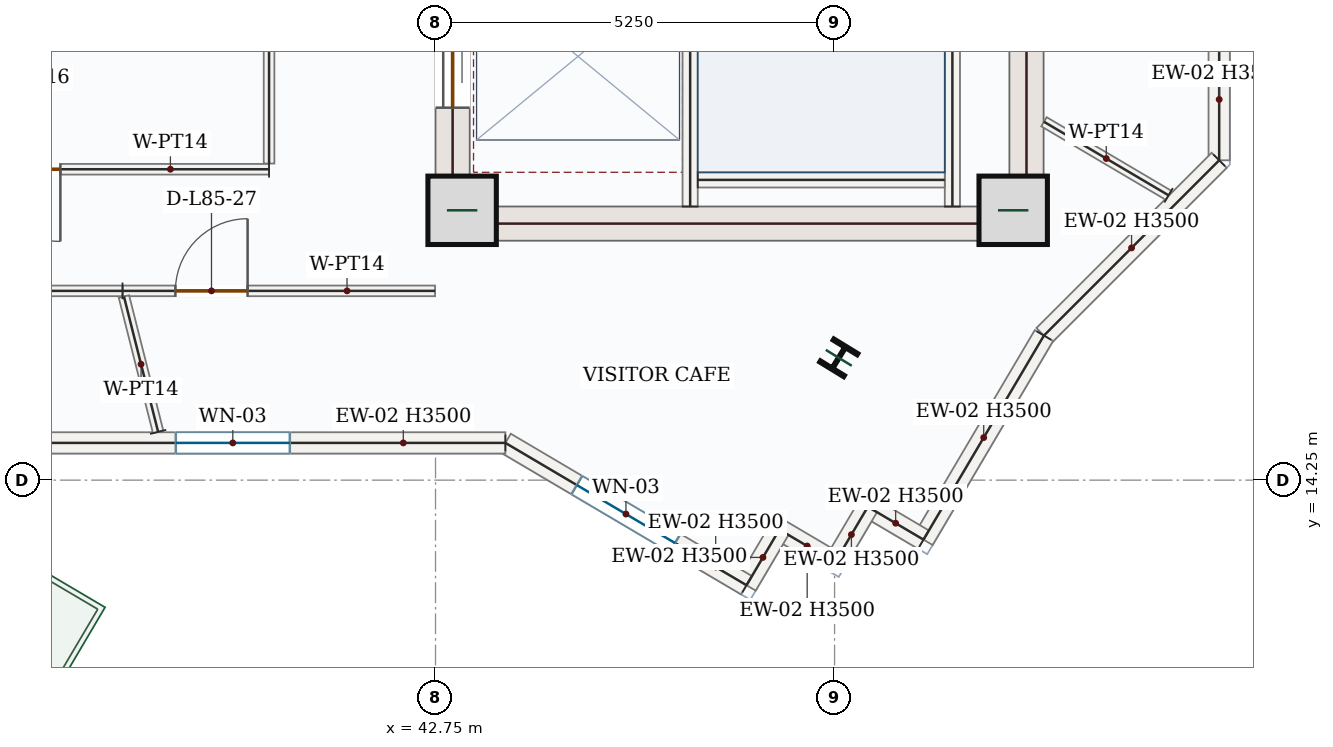
"""IFC4 building model, lengths in metres.
Left out: names, types, materials, properties, quantities, classifications, styles, units other than length and angle.
Written with IfcOpenShell. Run it as: python <this file> out.ifc"""

import sys

from ifc_helpers import new_model, si_unit, direction, frame, frame_2d, origin, origin_2d, place, context, subcontext, project, spatial, rectangle, i_section, extrude, source, transform, mapped, element, fill, save


model = new_model("IFC4")
c1 = context("Model", 3, precision=1e-05, world=origin(), true_north=direction((0.0, 1.0)))
c2 = subcontext(c1, "Body", "Model", "MODEL_VIEW")
j1 = project(units=[si_unit("LENGTHUNIT", "METRE"), si_unit("PLANEANGLEUNIT", "RADIAN")], contexts=[c1])
p1 = place(None, origin())
s1 = spatial("IfcSite", under=j1, at=p1, CompositionType="ELEMENT")
p2 = place(p1, origin())
s2 = spatial("IfcBuilding", under=s1, at=p2, CompositionType="ELEMENT")
p3 = place(p2, frame((0.0, 0.0, 349.8)))
s3 = spatial("IfcBuildingStorey", under=s2, at=p3, CompositionType="ELEMENT", Elevation=349.8)
p4 = place(p3, frame((42.975, 17.4, 0.0), z_axis=(0.0, 0.0, 1.0), x_axis=(0.0, 1.0, 0.0)))
e1 = element("IfcWall", 1, at=p4, inside=s3, PredefinedType="SHEAR", context=c2, shape_type="SweptSolid", body=[
    extrude(rectangle(XDim=8.55, YDim=0.45, at=frame_2d((4.275, 0.0))), origin(), (0.0, 0.0, 1.0), 3.5),
])
p5 = place(p4, frame((6.65, 0.0, 0.0)))
e2 = element("IfcOpeningElement", 2, at=p5, cuts=e1, PredefinedType="OPENING", context=c2, shape_type="SweptSolid", body=[
    extrude(rectangle(XDim=1.1, YDim=2.2, at=frame_2d((0.55, 1.1))), frame((0.0, 0.235, 0.0), z_axis=(0.0, -1.0, 0.0), x_axis=(1.0, 0.0, 0.0)), (0.0, 0.0, 1.0), 0.47),
])
p6 = place(p4, frame((1.75, 0.0, 0.0)))
e3 = element("IfcOpeningElement", 3, at=p6, cuts=e1, PredefinedType="OPENING", context=c2, shape_type="SweptSolid", body=[
    extrude(rectangle(XDim=1.3, YDim=2.2, at=frame_2d((0.65, 1.1))), frame((0.0, 0.235, 0.0), z_axis=(0.0, -1.0, 0.0), x_axis=(1.0, 0.0, 0.0)), (0.0, 0.0, 1.0), 0.47),
])
p7 = place(p4, frame((4.3, 0.0, 0.0)))
e4 = element("IfcOpeningElement", 4, at=p7, cuts=e1, PredefinedType="OPENING", context=c2, shape_type="SweptSolid", body=[
    extrude(rectangle(XDim=0.88, YDim=2.1, at=frame_2d((0.44, 1.05))), frame((0.0, 0.235, 0.0), z_axis=(0.0, -1.0, 0.0), x_axis=(1.0, 0.0, 0.0)), (0.0, 0.0, 1.0), 0.47),
])
m1 = source(origin(), c2, "Body", "SweptSolid", [
    extrude(rectangle(XDim=8.55, YDim=0.45, at=frame_2d((4.275, 0.0))), origin(), (0.0, 0.0, 1.0), 3.5),
])
p8 = place(p3, frame((50.525, 17.4, 0.0), z_axis=(0.0, 0.0, 1.0), x_axis=(0.0, 1.0, 0.0)))
e5 = element("IfcWall", 5, at=p8, inside=s3, PredefinedType="SHEAR", context=c2, shape_type="MappedRepresentation", body=[
    mapped(m1, transform((0.0, 0.0, 0.0), x_axis=(1.0, 0.0, 0.0), y_axis=(0.0, 1.0, 0.0), z_axis=(0.0, 0.0, 1.0), scale=1.0)),
])
m2 = source(origin(), c2, "Body", "SweptSolid", [
    extrude(rectangle(XDim=7.1, YDim=0.45, at=frame_2d((3.55, 0.0))), origin(), (0.0, 0.0, 1.0), 3.5),
])
p9 = place(p3, frame((43.2, 17.625, 0.0), z_axis=(0.0, 0.0, 1.0), x_axis=(1.0, 0.0, 0.0)))
e6 = element("IfcWall", 6, at=p9, inside=s3, PredefinedType="SHEAR", context=c2, shape_type="MappedRepresentation", body=[
    mapped(m2, transform((0.0, 0.0, 0.0), x_axis=(1.0, 0.0, 0.0), y_axis=(0.0, 1.0, 0.0), z_axis=(0.0, 0.0, 1.0), scale=1.0)),
])
m3 = source(origin(), c2, "Body", "SweptSolid", [
    extrude(rectangle(XDim=0.9, YDim=0.9, at=origin_2d()), origin(), (0.0, 0.0, 1.0), 3.75),
])
for number, where, z_axis, x_axis in (
    (7, (43.1, 17.8, 0.0), (0.0, 0.0, 1.0), (1.0, 0.0, 0.0)),
    (8, (50.35, 17.8, 0.0), (0.0, 0.0, 1.0), (1.0, 0.0, 0.0)),
):
    element("IfcColumn", number, at=place(p3, frame(where, z_axis=z_axis, x_axis=x_axis)), inside=s3, PredefinedType="COLUMN", context=c2, shape_type="MappedRepresentation", body=[
        mapped(m3, transform((0.0, 0.0, 0.0), x_axis=(1.0, 0.0, 0.0), y_axis=(0.0, 1.0, 0.0), z_axis=(0.0, 0.0, 1.0), scale=1.0)),
    ])
m4 = source(origin(), c2, "Body", "SweptSolid", [
    extrude(i_section(OverallWidth=0.369, OverallDepth=0.356, WebThickness=0.011, FlangeThickness=0.018, FilletRadius=0.018, at=origin_2d()), origin(), (0.0, 0.0, 1.0), 3.75),
])
p10 = place(p3, frame((48.055, 15.859, 0.0), z_axis=(0.0, 0.0, 1.0), x_axis=(-0.852640164354, 0.522498564716, 0.0)))
e9 = element("IfcColumn", 9, at=p10, inside=s3, PredefinedType="COLUMN", context=c2, shape_type="MappedRepresentation", body=[
    mapped(m4, transform((0.0, 0.0, 0.0), x_axis=(1.0, 0.0, 0.0), y_axis=(0.0, 1.0, 0.0), z_axis=(0.0, 0.0, 1.0), scale=1.0)),
])
m5 = source(origin(), c2, "Body", "SweptSolid", [
    extrude(rectangle(XDim=1.601, YDim=0.28, at=frame_2d((0.8, 0.0))), origin(), (0.0, 0.0, 1.0), 3.5),
])
p11 = place(p3, frame((53.06, 20.059, 0.0), z_axis=(0.0, 0.0, 1.0), x_axis=(0.0, -1.0, 0.0)))
e10 = element("IfcWall", 10, at=p11, inside=s3, PredefinedType="SOLIDWALL", context=c2, shape_type="MappedRepresentation", body=[
    mapped(m5, transform((0.0, 0.0, 0.0), x_axis=(1.0, 0.0, 0.0), y_axis=(0.0, 1.0, 0.0), z_axis=(0.0, 0.0, 1.0), scale=1.0)),
])
m6 = source(origin(), c2, "Body", "SweptSolid", [
    extrude(rectangle(XDim=3.261, YDim=0.28, at=frame_2d((1.63, 0.0))), origin(), (0.0, 0.0, 1.0), 3.5),
])
p12 = place(p3, frame((53.06, 18.458, 0.0), z_axis=(0.0, 0.0, 1.0), x_axis=(-0.707106781187, -0.707106781187, 0.0)))
e11 = element("IfcWall", 11, at=p12, inside=s3, PredefinedType="SOLIDWALL", context=c2, shape_type="MappedRepresentation", body=[
    mapped(m6, transform((0.0, 0.0, 0.0), x_axis=(1.0, 0.0, 0.0), y_axis=(0.0, 1.0, 0.0), z_axis=(0.0, 0.0, 1.0), scale=1.0)),
])
m7 = source(origin(), c2, "Body", "SweptSolid", [
    extrude(rectangle(XDim=3.118, YDim=0.28, at=frame_2d((1.559, 0.0))), origin(), (0.0, 0.0, 1.0), 3.5),
])
p13 = place(p3, frame((50.754, 16.152, 0.0), z_axis=(0.0, 0.0, 1.0), x_axis=(-0.508275482209, -0.861194539106, 0.0)))
e12 = element("IfcWall", 12, at=p13, inside=s3, PredefinedType="SOLIDWALL", context=c2, shape_type="MappedRepresentation", body=[
    mapped(m7, transform((0.0, 0.0, 0.0), x_axis=(1.0, 0.0, 0.0), y_axis=(0.0, 1.0, 0.0), z_axis=(0.0, 0.0, 1.0), scale=1.0)),
])
m8 = source(origin(), c2, "Body", "SweptSolid", [
    extrude(rectangle(XDim=0.85, YDim=0.28, at=frame_2d((0.425, 0.0))), origin(), (0.0, 0.0, 1.0), 3.5),
])
for number, where, z_axis, x_axis in (
    (13, (49.17, 13.467, 0.0), (0.0, 0.0, 1.0), (-0.861, 0.508, 0.0)),
    (14, (48.438, 13.899, 0.0), (0.0, 0.0, 1.0), (-0.508, -0.861, 0.0)),
    (15, (48.006, 13.167, 0.0), (0.0, 0.0, 1.0), (-0.861, 0.508, 0.0)),
    (16, (47.274, 13.6, 0.0), (0.0, 0.0, 1.0), (-0.508, -0.861, 0.0)),
):
    element("IfcWall", number, at=place(p3, frame(where, z_axis=z_axis, x_axis=x_axis)), inside=s3, PredefinedType="SOLIDWALL", context=c2, shape_type="MappedRepresentation", body=[
        mapped(m8, transform((0.0, 0.0, 0.0), x_axis=(1.0, 0.0, 0.0), y_axis=(0.0, 1.0, 0.0), z_axis=(0.0, 0.0, 1.0), scale=1.0)),
    ])
p14 = place(p3, frame((46.842, 12.867, 0.0), z_axis=(0.0, 0.0, 1.0), x_axis=(-0.861166561994, 0.508322882137, 0.0)))
e17 = element("IfcWall", 17, at=p14, inside=s3, PredefinedType="SOLIDWALL", context=c2, shape_type="SweptSolid", body=[
    extrude(rectangle(XDim=3.684, YDim=0.28, at=frame_2d((1.842, 0.0))), origin(), (0.0, 0.0, 1.0), 3.5),
])
p15 = place(p14, frame((1.092, 0.0, 0.85)))
e18 = element("IfcOpeningElement", 18, at=p15, cuts=e17, PredefinedType="OPENING", context=c2, shape_type="SweptSolid", body=[
    extrude(rectangle(XDim=1.5, YDim=1.5, at=frame_2d((0.75, 0.75))), frame((0.0, 0.15, 0.0), z_axis=(0.0, -1.0, 0.0), x_axis=(1.0, 0.0, 0.0)), (0.0, 0.0, 1.0), 0.3),
])
p16 = place(p3, frame((43.669, 14.74, 0.0), z_axis=(0.0, 0.0, 1.0), x_axis=(-1.0, 0.0, 0.0)))
e19 = element("IfcWall", 19, at=p16, inside=s3, PredefinedType="SOLIDWALL", context=c2, shape_type="SweptSolid", body=[
    extrude(rectangle(XDim=7.172, YDim=0.28, at=frame_2d((3.586, 0.0))), origin(), (0.0, 0.0, 1.0), 3.5),
])
p17 = place(p16, frame((2.836, 0.0, 0.85)))
e20 = element("IfcOpeningElement", 20, at=p17, cuts=e19, PredefinedType="OPENING", context=c2, shape_type="SweptSolid", body=[
    extrude(rectangle(XDim=1.5, YDim=1.5, at=frame_2d((0.75, 0.75))), frame((0.0, 0.15, 0.0), z_axis=(0.0, -1.0, 0.0), x_axis=(1.0, 0.0, 0.0)), (0.0, 0.0, 1.0), 0.3),
])
m9 = source(origin(), c2, "Body", "SweptSolid", [
    extrude(rectangle(XDim=7.87, YDim=0.2, at=frame_2d((3.935, 0.0))), origin(), (0.0, 0.0, 1.0), 3.5),
])
p18 = place(p3, frame((49.55, 17.85, 0.0), z_axis=(0.0, 0.0, 1.0), x_axis=(0.0, 1.0, 0.0)))
e21 = element("IfcWall", 21, at=p18, inside=s3, PredefinedType="SOLIDWALL", context=c2, shape_type="MappedRepresentation", body=[
    mapped(m9, transform((0.0, 0.0, 0.0), x_axis=(1.0, 0.0, 0.0), y_axis=(0.0, 1.0, 0.0), z_axis=(0.0, 0.0, 1.0), scale=1.0)),
])
p19 = place(p3, frame((46.1, 17.85, 0.0), z_axis=(0.0, 0.0, 1.0), x_axis=(0.0, 1.0, 0.0)))
e22 = element("IfcWall", 22, at=p19, inside=s3, PredefinedType="SOLIDWALL", context=c2, shape_type="SweptSolid", body=[
    extrude(rectangle(XDim=8.0, YDim=0.2, at=frame_2d((4.0, 0.0))), origin(), (0.0, 0.0, 1.0), 3.5),
])
p20 = place(p19, frame((6.3, 0.0, 0.0)))
e23 = element("IfcOpeningElement", 23, at=p20, cuts=e22, PredefinedType="OPENING", context=c2, shape_type="SweptSolid", body=[
    extrude(rectangle(XDim=1.05, YDim=2.15, at=frame_2d((0.525, 1.075))), frame((0.0, 0.11, 0.0), z_axis=(0.0, -1.0, 0.0), x_axis=(1.0, 0.0, 0.0)), (0.0, 0.0, 1.0), 0.22),
])
m10 = source(origin(), c2, "Body", "SweptSolid", [
    extrude(rectangle(XDim=3.25, YDim=0.2, at=frame_2d((1.625, 0.0))), origin(), (0.0, 0.0, 1.0), 3.5),
])
p21 = place(p3, frame((46.2, 18.2, 0.0), z_axis=(0.0, 0.0, 1.0), x_axis=(1.0, 0.0, 0.0)))
e24 = element("IfcWall", 24, at=p21, inside=s3, PredefinedType="SOLIDWALL", context=c2, shape_type="MappedRepresentation", body=[
    mapped(m10, transform((0.0, 0.0, 0.0), x_axis=(1.0, 0.0, 0.0), y_axis=(0.0, 1.0, 0.0), z_axis=(0.0, 0.0, 1.0), scale=1.0)),
])
p22 = place(p3, frame((40.56, 18.34, 0.0), z_axis=(0.0, 0.0, 1.0), x_axis=(-1.0, 0.0, 0.0)))
e25 = element("IfcWall", 25, at=p22, inside=s3, PredefinedType="PARTITIONING", context=c2, shape_type="SweptSolid", body=[
    extrude(rectangle(XDim=4.47, YDim=0.14, at=frame_2d((2.235, 0.0))), origin(), (0.0, 0.0, 1.0), 3.5),
])
p23 = place(p22, frame((2.746, 0.0, 0.0)))
e26 = element("IfcOpeningElement", 26, at=p23, cuts=e25, PredefinedType="OPENING", context=c2, shape_type="SweptSolid", body=[
    extrude(rectangle(XDim=0.95, YDim=2.15, at=frame_2d((0.475, 1.075))), frame((0.0, 0.08, 0.0), z_axis=(0.0, -1.0, 0.0), x_axis=(1.0, 0.0, 0.0)), (0.0, 0.0, 1.0), 0.16),
])
m11 = source(origin(), c2, "Body", "SweptSolid", [
    extrude(rectangle(XDim=3.52, YDim=0.14, at=frame_2d((1.76, 0.0))), origin(), (0.0, 0.0, 1.0), 3.5),
])
p24 = place(p3, frame((40.56, 21.935, 0.0), z_axis=(0.0, 0.0, 1.0), x_axis=(0.0, -1.0, 0.0)))
e27 = element("IfcWall", 27, at=p24, inside=s3, PredefinedType="PARTITIONING", context=c2, shape_type="MappedRepresentation", body=[
    mapped(m11, transform((0.0, 0.0, 0.0), x_axis=(1.0, 0.0, 0.0), y_axis=(0.0, 1.0, 0.0), z_axis=(0.0, 0.0, 1.0), scale=1.0)),
])
m12 = source(origin(), c2, "Body", "SweptSolid", [
    extrude(rectangle(XDim=1.904, YDim=0.14, at=frame_2d((0.952, 0.0))), origin(), (0.0, 0.0, 1.0), 3.5),
])
p25 = place(p3, frame((52.394, 17.997, 0.0), z_axis=(0.0, 0.0, 1.0), x_axis=(-0.86120470185, 0.508258262611, 0.0)))
e28 = element("IfcWall", 28, at=p25, inside=s3, PredefinedType="PARTITIONING", context=c2, shape_type="MappedRepresentation", body=[
    mapped(m12, transform((0.0, 0.0, 0.0), x_axis=(1.0, 0.0, 0.0), y_axis=(0.0, 1.0, 0.0), z_axis=(0.0, 0.0, 1.0), scale=1.0)),
])
p26 = place(p3, frame((38.632, 16.74, 0.0), z_axis=(0.0, 0.0, 1.0), x_axis=(1.0, 0.0, 0.0)))
e29 = element("IfcWall", 29, at=p26, inside=s3, PredefinedType="PARTITIONING", context=c2, shape_type="SweptSolid", body=[
    extrude(rectangle(XDim=4.112, YDim=0.14, at=frame_2d((2.056, 0.0))), origin(), (0.0, 0.0, 1.0), 3.5),
])
p27 = place(p26, frame((0.696, 0.0, 0.0)))
e30 = element("IfcOpeningElement", 30, at=p27, cuts=e29, PredefinedType="OPENING", context=c2, shape_type="SweptSolid", body=[
    extrude(rectangle(XDim=0.95, YDim=2.15, at=frame_2d((0.475, 1.075))), frame((0.0, 0.08, 0.0), z_axis=(0.0, -1.0, 0.0), x_axis=(1.0, 0.0, 0.0)), (0.0, 0.0, 1.0), 0.16),
])
m13 = source(origin(), c2, "Body", "SweptSolid", [
    extrude(rectangle(XDim=1.836, YDim=0.14, at=frame_2d((0.918, 0.0))), origin(), (0.0, 0.0, 1.0), 3.5),
])
p28 = place(p3, frame((39.101, 14.885, 0.0), z_axis=(0.0, 0.0, 1.0), x_axis=(-0.24494411221, 0.96953719985, 0.0)))
e31 = element("IfcWall", 31, at=p28, inside=s3, PredefinedType="PARTITIONING", context=c2, shape_type="MappedRepresentation", body=[
    mapped(m13, transform((0.0, 0.0, 0.0), x_axis=(1.0, 0.0, 0.0), y_axis=(0.0, 1.0, 0.0), z_axis=(0.0, 0.0, 1.0), scale=1.0)),
])
p29 = place(p3, frame((30.618, 16.74, 0.0), z_axis=(0.0, 0.0, 1.0), x_axis=(1.0, 0.0, 0.0)))
e32 = element("IfcWall", 32, at=p29, inside=s3, PredefinedType="PARTITIONING", context=c2, shape_type="SweptSolid", body=[
    extrude(rectangle(XDim=8.014, YDim=0.14, at=frame_2d((4.007, 0.0))), origin(), (0.0, 0.0, 1.0), 3.5),
])
p30 = place(p29, frame((4.592, 0.0, 0.0)))
e33 = element("IfcOpeningElement", 33, at=p30, cuts=e32, PredefinedType="OPENING", context=c2, shape_type="SweptSolid", body=[
    extrude(rectangle(XDim=0.95, YDim=2.15, at=frame_2d((0.475, 1.075))), frame((0.0, 0.08, 0.0), z_axis=(0.0, -1.0, 0.0), x_axis=(1.0, 0.0, 0.0)), (0.0, 0.0, 1.0), 0.16),
])
m14 = source(origin(), c2, "Body", "SweptSolid", [
    extrude(rectangle(XDim=1.5, YDim=1.5, at=frame_2d((0.75, 0.75))), frame((0.0, 0.03, 0.0), z_axis=(0.0, -1.0, 0.0), x_axis=(1.0, 0.0, 0.0)), (0.0, 0.0, 1.0), 0.06),
])
p31 = place(p15, origin())
e34 = element("IfcWindow", 34, at=p31, inside=s3, PartitioningType="SINGLE_PANEL", PredefinedType="WINDOW", context=c2, shape_type="MappedRepresentation", body=[
    mapped(m14, transform((0.0, 0.0, 0.0), x_axis=(1.0, 0.0, 0.0), y_axis=(0.0, 1.0, 0.0), z_axis=(0.0, 0.0, 1.0), scale=1.0)),
])
fill(e18, e34)
p32 = place(p17, origin())
e35 = element("IfcWindow", 35, at=p32, inside=s3, PartitioningType="SINGLE_PANEL", PredefinedType="WINDOW", context=c2, shape_type="MappedRepresentation", body=[
    mapped(m14, transform((0.0, 0.0, 0.0), x_axis=(1.0, 0.0, 0.0), y_axis=(0.0, 1.0, 0.0), z_axis=(0.0, 0.0, 1.0), scale=1.0)),
])
fill(e20, e35)
m15 = source(origin(), c2, "Body", "SweptSolid", [
    extrude(rectangle(XDim=1.3, YDim=2.2, at=frame_2d((0.65, 1.1))), frame((0.0, 0.025, 0.0), z_axis=(0.0, -1.0, 0.0), x_axis=(1.0, 0.0, 0.0)), (0.0, 0.0, 1.0), 0.05),
])
p33 = place(p6, origin())
e36 = element("IfcDoor", 36, at=p33, inside=s3, OperationType="DOUBLE_DOOR_SLIDING", PredefinedType="DOOR", context=c2, shape_type="MappedRepresentation", body=[
    mapped(m15, transform((0.0, 0.0, 0.0), x_axis=(1.0, 0.0, 0.0), y_axis=(0.0, 1.0, 0.0), z_axis=(0.0, 0.0, 1.0), scale=1.0)),
])
fill(e3, e36)
m16 = source(origin(), c2, "Body", "SweptSolid", [
    extrude(rectangle(XDim=0.95, YDim=2.15, at=frame_2d((0.475, 1.075))), frame((0.0, 0.025, 0.0), z_axis=(0.0, -1.0, 0.0), x_axis=(1.0, 0.0, 0.0)), (0.0, 0.0, 1.0), 0.05),
])
p34 = place(p23, origin())
e37 = element("IfcDoor", 37, at=p34, inside=s3, OperationType="SINGLE_SWING_LEFT", PredefinedType="DOOR", context=c2, shape_type="MappedRepresentation", body=[
    mapped(m16, transform((0.0, 0.0, 0.0), x_axis=(1.0, 0.0, 0.0), y_axis=(0.0, 1.0, 0.0), z_axis=(0.0, 0.0, 1.0), scale=1.0)),
])
fill(e26, e37)
p35 = place(p27, origin())
e38 = element("IfcDoor", 38, at=p35, inside=s3, OperationType="SINGLE_SWING_RIGHT", PredefinedType="DOOR", context=c2, shape_type="MappedRepresentation", body=[
    mapped(m16, transform((0.0, 0.0, 0.0), x_axis=(1.0, 0.0, 0.0), y_axis=(0.0, 1.0, 0.0), z_axis=(0.0, 0.0, 1.0), scale=1.0)),
])
fill(e30, e38)
save(model, sys.argv[1])
